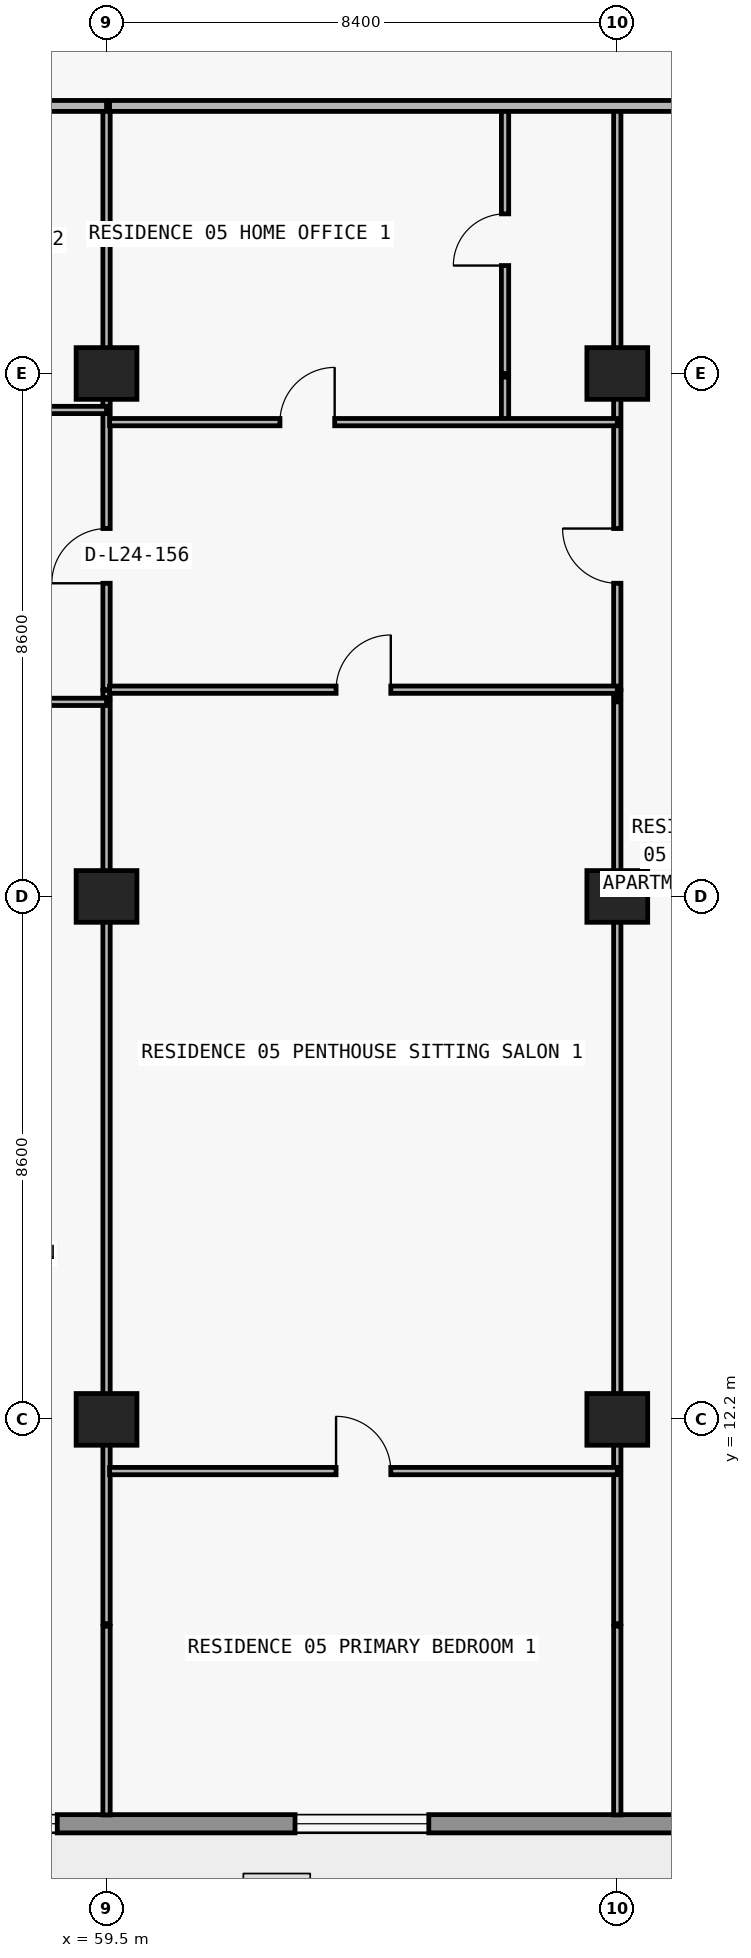
"""IFC4 building model, lengths in metres.
Left out: names, types, materials, properties, quantities, classifications, styles, units other than length and angle.
Written with IfcOpenShell. Run it as: python <this file> out.ifc"""

import sys

from ifc_helpers import new_model, si_unit, direction, frame, frame_2d, origin, origin_2d, place, context, subcontext, project, spatial, rectangle, extrude, element, fill, save


model = new_model("IFC4")
c1 = context("Model", 3, precision=1e-05, world=origin(), true_north=direction((0.0, 1.0)))
c2 = subcontext(c1, "Body", "Model", "MODEL_VIEW")
j1 = project(units=[si_unit("LENGTHUNIT", "METRE"), si_unit("PLANEANGLEUNIT", "RADIAN")], contexts=[c1])
p1 = place(None, origin())
s1 = spatial("IfcSite", under=j1, at=p1, CompositionType="ELEMENT")
p2 = place(p1, origin())
s2 = spatial("IfcBuilding", under=s1, at=p2, CompositionType="ELEMENT")
p3 = place(p2, frame((0.0, 0.0, 91.2)))
s3 = spatial("IfcBuildingStorey", under=s2, at=p3, CompositionType="ELEMENT", Elevation=91.2)
for number, where, z_axis, x_axis in (
    (1, (59.5, 12.2, 0.0), (0.0, 0.0, 1.0), (1.0, 0.0, 0.0)),
    (2, (67.9, 12.2, 0.0), (0.0, 0.0, 1.0), (1.0, 0.0, 0.0)),
    (3, (59.5, 20.8, 0.0), (0.0, 0.0, 1.0), (1.0, 0.0, 0.0)),
    (4, (67.9, 20.8, 0.0), (0.0, 0.0, 1.0), (1.0, 0.0, 0.0)),
    (5, (59.5, 29.4, 0.0), (0.0, 0.0, 1.0), (1.0, 0.0, 0.0)),
    (6, (67.9, 29.4, 0.0), (0.0, 0.0, 1.0), (1.0, 0.0, 0.0)),
):
    element("IfcColumn", number, at=place(p3, frame(where, z_axis=z_axis, x_axis=x_axis)), inside=s3, PredefinedType="COLUMN", context=c2, shape_type="SweptSolid", body=[
        extrude(rectangle(XDim=1.0, YDim=0.85, at=origin_2d()), origin(), (0.0, 0.0, 1.0), 3.05),
    ])
p4 = place(p3, frame((70.1, 5.55, 0.0), z_axis=(0.0, 0.0, 1.0), x_axis=(-1.0, 0.0, 0.0)))
e7 = element("IfcWall", 7, at=p4, inside=s3, PredefinedType="STANDARD", context=c2, shape_type="SweptSolid", body=[
    extrude(rectangle(XDim=62.4, YDim=0.3, at=frame_2d((31.2, 0.0))), origin(), (0.0, 0.0, 1.0), 3.05),
])
p5 = place(p4, frame((57.29, 0.0, 0.0)))
e8 = element("IfcOpeningElement", 8, at=p5, cuts=e7, PredefinedType="OPENING", context=c2, shape_type="SweptSolid", body=[
    extrude(rectangle(XDim=2.0, YDim=2.3, at=frame_2d((1.0, 1.15))), frame((0.0, 0.16, 0.0), z_axis=(0.0, -1.0, 0.0), x_axis=(1.0, 0.0, 0.0)), (0.0, 0.0, 1.0), 0.32),
])
p6 = place(p4, frame((52.61, 0.0, 0.65)))
e9 = element("IfcOpeningElement", 9, at=p6, cuts=e7, PredefinedType="OPENING", context=c2, shape_type="SweptSolid", body=[
    extrude(rectangle(XDim=2.6, YDim=1.85, at=frame_2d((1.3, 0.925))), frame((0.0, 0.16, 0.0), z_axis=(0.0, -1.0, 0.0), x_axis=(1.0, 0.0, 0.0)), (0.0, 0.0, 1.0), 0.32),
])
p7 = place(p4, frame((46.5, 0.0, 0.85)))
e10 = element("IfcOpeningElement", 10, at=p7, cuts=e7, PredefinedType="OPENING", context=c2, shape_type="SweptSolid", body=[
    extrude(rectangle(XDim=2.2, YDim=1.55, at=frame_2d((1.1, 0.775))), frame((0.0, 0.16, 0.0), z_axis=(0.0, -1.0, 0.0), x_axis=(1.0, 0.0, 0.0)), (0.0, 0.0, 1.0), 0.32),
])
p8 = place(p4, frame((40.09, 0.0, 0.0)))
e11 = element("IfcOpeningElement", 11, at=p8, cuts=e7, PredefinedType="OPENING", context=c2, shape_type="SweptSolid", body=[
    extrude(rectangle(XDim=2.0, YDim=2.3, at=frame_2d((1.0, 1.15))), frame((0.0, 0.16, 0.0), z_axis=(0.0, -1.0, 0.0), x_axis=(1.0, 0.0, 0.0)), (0.0, 0.0, 1.0), 0.32),
])
p9 = place(p4, frame((35.99, 0.0, 0.85)))
e12 = element("IfcOpeningElement", 12, at=p9, cuts=e7, PredefinedType="OPENING", context=c2, shape_type="SweptSolid", body=[
    extrude(rectangle(XDim=1.8, YDim=1.55, at=frame_2d((0.9, 0.775))), frame((0.0, 0.16, 0.0), z_axis=(0.0, -1.0, 0.0), x_axis=(1.0, 0.0, 0.0)), (0.0, 0.0, 1.0), 0.32),
])
p10 = place(p4, frame((28.314, 0.0, 0.85)))
e13 = element("IfcOpeningElement", 13, at=p10, cuts=e7, PredefinedType="OPENING", context=c2, shape_type="SweptSolid", body=[
    extrude(rectangle(XDim=2.2, YDim=1.55, at=frame_2d((1.1, 0.775))), frame((0.0, 0.16, 0.0), z_axis=(0.0, -1.0, 0.0), x_axis=(1.0, 0.0, 0.0)), (0.0, 0.0, 1.0), 0.32),
])
p11 = place(p4, frame((24.09, 0.0, 0.0)))
e14 = element("IfcOpeningElement", 14, at=p11, cuts=e7, PredefinedType="OPENING", context=c2, shape_type="SweptSolid", body=[
    extrude(rectangle(XDim=2.0, YDim=2.3, at=frame_2d((1.0, 1.15))), frame((0.0, 0.16, 0.0), z_axis=(0.0, -1.0, 0.0), x_axis=(1.0, 0.0, 0.0)), (0.0, 0.0, 1.0), 0.32),
])
p12 = place(p4, frame((19.99, 0.0, 0.85)))
e15 = element("IfcOpeningElement", 15, at=p12, cuts=e7, PredefinedType="OPENING", context=c2, shape_type="SweptSolid", body=[
    extrude(rectangle(XDim=1.8, YDim=1.55, at=frame_2d((0.9, 0.775))), frame((0.0, 0.16, 0.0), z_axis=(0.0, -1.0, 0.0), x_axis=(1.0, 0.0, 0.0)), (0.0, 0.0, 1.0), 0.32),
])
p13 = place(p4, frame((16.09, 0.0, 0.0)))
e16 = element("IfcOpeningElement", 16, at=p13, cuts=e7, PredefinedType="OPENING", context=c2, shape_type="SweptSolid", body=[
    extrude(rectangle(XDim=2.0, YDim=2.3, at=frame_2d((1.0, 1.15))), frame((0.0, 0.16, 0.0), z_axis=(0.0, -1.0, 0.0), x_axis=(1.0, 0.0, 0.0)), (0.0, 0.0, 1.0), 0.32),
])
p14 = place(p4, frame((11.41, 0.0, 0.65)))
e17 = element("IfcOpeningElement", 17, at=p14, cuts=e7, PredefinedType="OPENING", context=c2, shape_type="SweptSolid", body=[
    extrude(rectangle(XDim=2.6, YDim=1.85, at=frame_2d((1.3, 0.925))), frame((0.0, 0.16, 0.0), z_axis=(0.0, -1.0, 0.0), x_axis=(1.0, 0.0, 0.0)), (0.0, 0.0, 1.0), 0.32),
])
p15 = place(p4, frame((5.3, 0.0, 0.85)))
e18 = element("IfcOpeningElement", 18, at=p15, cuts=e7, PredefinedType="OPENING", context=c2, shape_type="SweptSolid", body=[
    extrude(rectangle(XDim=2.2, YDim=1.55, at=frame_2d((1.1, 0.775))), frame((0.0, 0.16, 0.0), z_axis=(0.0, -1.0, 0.0), x_axis=(1.0, 0.0, 0.0)), (0.0, 0.0, 1.0), 0.32),
])
p16 = place(p3, frame((59.5, 5.695, 0.0), z_axis=(0.0, 0.0, 1.0), x_axis=(0.0, 1.0, 0.0)))
e19 = element("IfcWall", 19, at=p16, inside=s3, PredefinedType="PARTITIONING", context=c2, shape_type="SweptSolid", body=[
    extrude(rectangle(XDim=3.105, YDim=0.12, at=frame_2d((1.552, 0.0))), origin(), (0.0, 0.0, 1.0), 3.05),
])
p17 = place(p3, frame((59.5, 8.84, 0.0), z_axis=(0.0, 0.0, 1.0), x_axis=(0.0, 1.0, 0.0)))
e20 = element("IfcWall", 20, at=p17, inside=s3, PredefinedType="PARTITIONING", context=c2, shape_type="SweptSolid", body=[
    extrude(rectangle(XDim=15.16, YDim=0.12, at=frame_2d((7.58, 0.0))), origin(), (0.0, 0.0, 1.0), 2.174),
])
p18 = place(p3, frame((59.5, 24.07, 0.0), z_axis=(0.0, 0.0, 1.0), x_axis=(0.0, 1.0, 0.0)))
e21 = element("IfcWall", 21, at=p18, inside=s3, PredefinedType="PARTITIONING", context=c2, shape_type="SweptSolid", body=[
    extrude(rectangle(XDim=0.12, YDim=0.12, at=frame_2d((0.06, 0.0))), origin(), (0.0, 0.0, 1.0), 2.174),
])
p19 = place(p3, frame((59.5, 24.2, 0.0), z_axis=(0.0, 0.0, 1.0), x_axis=(0.0, 1.0, 0.0)))
e22 = element("IfcWall", 22, at=p19, inside=s3, PredefinedType="PARTITIONING", context=c2, shape_type="SweptSolid", body=[
    extrude(rectangle(XDim=5.14, YDim=0.12, at=frame_2d((2.57, 0.0))), origin(), (0.0, 0.0, 1.0), 2.174),
])
p20 = place(p19, frame((1.75, 0.0, 0.0)))
e23 = element("IfcOpeningElement", 23, at=p20, cuts=e22, PredefinedType="OPENING", context=c2, shape_type="SweptSolid", body=[
    extrude(rectangle(XDim=0.9, YDim=2.124, at=frame_2d((0.45, 1.062))), frame((0.0, 0.07, 0.0), z_axis=(0.0, -1.0, 0.0), x_axis=(1.0, 0.0, 0.0)), (0.0, 0.0, 1.0), 0.14),
])
p21 = place(p3, frame((59.5, 29.4, 0.0), z_axis=(0.0, 0.0, 1.0), x_axis=(0.0, 1.0, 0.0)))
e24 = element("IfcWall", 24, at=p21, inside=s3, PredefinedType="PARTITIONING", context=c2, shape_type="SweptSolid", body=[
    extrude(rectangle(XDim=4.4, YDim=0.12, at=frame_2d((2.2, 0.0))), origin(), (0.0, 0.0, 1.0), 2.174),
])
p22 = place(p3, frame((66.054, 28.6, 0.0), z_axis=(0.0, 0.0, 1.0), x_axis=(0.0, 1.0, 0.0)))
e25 = element("IfcWall", 25, at=p22, inside=s3, PredefinedType="PARTITIONING", context=c2, shape_type="SweptSolid", body=[
    extrude(rectangle(XDim=0.74, YDim=0.12, at=frame_2d((0.37, 0.0))), origin(), (0.0, 0.0, 1.0), 3.05),
])
p23 = place(p3, frame((66.054, 29.4, 0.0), z_axis=(0.0, 0.0, 1.0), x_axis=(0.0, 1.0, 0.0)))
e26 = element("IfcWall", 26, at=p23, inside=s3, PredefinedType="PARTITIONING", context=c2, shape_type="SweptSolid", body=[
    extrude(rectangle(XDim=4.4, YDim=0.12, at=frame_2d((2.2, 0.0))), origin(), (0.0, 0.0, 1.0), 3.05),
])
p24 = place(p23, frame((1.775, 0.0, 0.0)))
e27 = element("IfcOpeningElement", 27, at=p24, cuts=e26, PredefinedType="OPENING", context=c2, shape_type="SweptSolid", body=[
    extrude(rectangle(XDim=0.85, YDim=2.1, at=frame_2d((0.425, 1.05))), frame((0.0, 0.07, 0.0), z_axis=(0.0, -1.0, 0.0), x_axis=(1.0, 0.0, 0.0)), (0.0, 0.0, 1.0), 0.14),
])
p25 = place(p3, frame((67.9, 5.695, 0.0), z_axis=(0.0, 0.0, 1.0), x_axis=(0.0, 1.0, 0.0)))
e28 = element("IfcWall", 28, at=p25, inside=s3, PredefinedType="PARTITIONING", context=c2, shape_type="SweptSolid", body=[
    extrude(rectangle(XDim=3.105, YDim=0.12, at=frame_2d((1.552, 0.0))), origin(), (0.0, 0.0, 1.0), 3.05),
])
p26 = place(p3, frame((67.9, 8.84, 0.0), z_axis=(0.0, 0.0, 1.0), x_axis=(0.0, 1.0, 0.0)))
e29 = element("IfcWall", 29, at=p26, inside=s3, PredefinedType="PARTITIONING", context=c2, shape_type="SweptSolid", body=[
    extrude(rectangle(XDim=15.16, YDim=0.12, at=frame_2d((7.58, 0.0))), origin(), (0.0, 0.0, 1.0), 2.174),
])
p27 = place(p3, frame((67.9, 24.07, 0.0), z_axis=(0.0, 0.0, 1.0), x_axis=(0.0, 1.0, 0.0)))
e30 = element("IfcWall", 30, at=p27, inside=s3, PredefinedType="PARTITIONING", context=c2, shape_type="SweptSolid", body=[
    extrude(rectangle(XDim=0.12, YDim=0.12, at=frame_2d((0.06, 0.0))), origin(), (0.0, 0.0, 1.0), 2.174),
])
p28 = place(p3, frame((67.9, 24.2, 0.0), z_axis=(0.0, 0.0, 1.0), x_axis=(0.0, 1.0, 0.0)))
e31 = element("IfcWall", 31, at=p28, inside=s3, PredefinedType="PARTITIONING", context=c2, shape_type="SweptSolid", body=[
    extrude(rectangle(XDim=5.14, YDim=0.12, at=frame_2d((2.57, 0.0))), origin(), (0.0, 0.0, 1.0), 2.174),
])
p29 = place(p28, frame((1.75, 0.0, 0.0)))
e32 = element("IfcOpeningElement", 32, at=p29, cuts=e31, PredefinedType="OPENING", context=c2, shape_type="SweptSolid", body=[
    extrude(rectangle(XDim=0.9, YDim=2.124, at=frame_2d((0.45, 1.062))), frame((0.0, 0.07, 0.0), z_axis=(0.0, -1.0, 0.0), x_axis=(1.0, 0.0, 0.0)), (0.0, 0.0, 1.0), 0.14),
])
p30 = place(p3, frame((67.9, 29.4, 0.0), z_axis=(0.0, 0.0, 1.0), x_axis=(0.0, 1.0, 0.0)))
e33 = element("IfcWall", 33, at=p30, inside=s3, PredefinedType="PARTITIONING", context=c2, shape_type="SweptSolid", body=[
    extrude(rectangle(XDim=4.4, YDim=0.12, at=frame_2d((2.2, 0.0))), origin(), (0.0, 0.0, 1.0), 2.174),
])
p31 = place(p3, frame((59.55, 11.35, 0.0), z_axis=(0.0, 0.0, 1.0), x_axis=(1.0, 0.0, 0.0)))
e34 = element("IfcWall", 34, at=p31, inside=s3, PredefinedType="PARTITIONING", context=c2, shape_type="SweptSolid", body=[
    extrude(rectangle(XDim=8.35, YDim=0.12, at=frame_2d((4.175, 0.0))), origin(), (0.0, 0.0, 1.0), 3.05),
])
p32 = place(p31, frame((3.725, 0.0, 0.0)))
e35 = element("IfcOpeningElement", 35, at=p32, cuts=e34, PredefinedType="OPENING", context=c2, shape_type="SweptSolid", body=[
    extrude(rectangle(XDim=0.9, YDim=2.15, at=frame_2d((0.45, 1.075))), frame((0.0, 0.07, 0.0), z_axis=(0.0, -1.0, 0.0), x_axis=(1.0, 0.0, 0.0)), (0.0, 0.0, 1.0), 0.14),
])
p33 = place(p3, frame((51.37, 24.0, 0.0), z_axis=(0.0, 0.0, 1.0), x_axis=(1.0, 0.0, 0.0)))
e36 = element("IfcWall", 36, at=p33, inside=s3, PredefinedType="PARTITIONING", context=c2, shape_type="SweptSolid", body=[
    extrude(rectangle(XDim=8.13, YDim=0.12, at=frame_2d((4.065, 0.0))), origin(), (0.0, 0.0, 1.0), 3.05),
])
p34 = place(p33, frame((1.305, 0.0, 0.0)))
e37 = element("IfcOpeningElement", 37, at=p34, cuts=e36, PredefinedType="OPENING", context=c2, shape_type="SweptSolid", body=[
    extrude(rectangle(XDim=0.9, YDim=2.15, at=frame_2d((0.45, 1.075))), frame((0.0, 0.07, 0.0), z_axis=(0.0, -1.0, 0.0), x_axis=(1.0, 0.0, 0.0)), (0.0, 0.0, 1.0), 0.14),
])
p35 = place(p3, frame((59.55, 24.2, 0.0), z_axis=(0.0, 0.0, 1.0), x_axis=(1.0, 0.0, 0.0)))
e38 = element("IfcWall", 38, at=p35, inside=s3, PredefinedType="PARTITIONING", context=c2, shape_type="SweptSolid", body=[
    extrude(rectangle(XDim=8.35, YDim=0.12, at=frame_2d((4.175, 0.0))), origin(), (0.0, 0.0, 1.0), 3.05),
])
p36 = place(p35, frame((3.725, 0.0, 0.0)))
e39 = element("IfcOpeningElement", 39, at=p36, cuts=e38, PredefinedType="OPENING", context=c2, shape_type="SweptSolid", body=[
    extrude(rectangle(XDim=0.9, YDim=2.15, at=frame_2d((0.45, 1.075))), frame((0.0, 0.07, 0.0), z_axis=(0.0, -1.0, 0.0), x_axis=(1.0, 0.0, 0.0)), (0.0, 0.0, 1.0), 0.14),
])
p37 = place(p3, frame((59.55, 28.6, 0.0), z_axis=(0.0, 0.0, 1.0), x_axis=(1.0, 0.0, 0.0)))
e40 = element("IfcWall", 40, at=p37, inside=s3, PredefinedType="PARTITIONING", context=c2, shape_type="SweptSolid", body=[
    extrude(rectangle(XDim=8.35, YDim=0.12, at=frame_2d((4.175, 0.0))), origin(), (0.0, 0.0, 1.0), 3.05),
])
p38 = place(p37, frame((2.802, 0.0, 0.0)))
e41 = element("IfcOpeningElement", 41, at=p38, cuts=e40, PredefinedType="OPENING", context=c2, shape_type="SweptSolid", body=[
    extrude(rectangle(XDim=0.9, YDim=2.15, at=frame_2d((0.45, 1.075))), frame((0.0, 0.07, 0.0), z_axis=(0.0, -1.0, 0.0), x_axis=(1.0, 0.0, 0.0)), (0.0, 0.0, 1.0), 0.14),
])
p39 = place(p3, frame((51.37, 28.8, 0.0), z_axis=(0.0, 0.0, 1.0), x_axis=(1.0, 0.0, 0.0)))
e42 = element("IfcWall", 42, at=p39, inside=s3, PredefinedType="PARTITIONING", context=c2, shape_type="SweptSolid", body=[
    extrude(rectangle(XDim=8.13, YDim=0.12, at=frame_2d((4.065, 0.0))), origin(), (0.0, 0.0, 1.0), 3.05),
])
p40 = place(p39, frame((1.305, 0.0, 0.0)))
e43 = element("IfcOpeningElement", 43, at=p40, cuts=e42, PredefinedType="OPENING", context=c2, shape_type="SweptSolid", body=[
    extrude(rectangle(XDim=0.9, YDim=2.15, at=frame_2d((0.45, 1.075))), frame((0.0, 0.07, 0.0), z_axis=(0.0, -1.0, 0.0), x_axis=(1.0, 0.0, 0.0)), (0.0, 0.0, 1.0), 0.14),
])
p41 = place(p3, frame((18.3, 33.8, 0.0), z_axis=(0.0, 0.0, 1.0), x_axis=(1.0, 0.0, 0.0)))
e44 = element("IfcWall", 44, at=p41, inside=s3, PredefinedType="PARTITIONING", context=c2, shape_type="SweptSolid", body=[
    extrude(rectangle(XDim=41.2, YDim=0.18, at=frame_2d((20.6, 0.0))), origin(), (0.0, 0.0, 1.0), 3.05),
])
p42 = place(p41, frame((10.946, 0.0, 0.0)))
e45 = element("IfcOpeningElement", 45, at=p42, cuts=e44, PredefinedType="OPENING", context=c2, shape_type="SweptSolid", body=[
    extrude(rectangle(XDim=1.0, YDim=2.2, at=frame_2d((0.5, 1.1))), frame((0.0, 0.1, 0.0), z_axis=(0.0, -1.0, 0.0), x_axis=(1.0, 0.0, 0.0)), (0.0, 0.0, 1.0), 0.2),
])
p43 = place(p41, frame((19.113, 0.0, 0.0)))
e46 = element("IfcOpeningElement", 46, at=p43, cuts=e44, PredefinedType="OPENING", context=c2, shape_type="SweptSolid", body=[
    extrude(rectangle(XDim=1.0, YDim=2.2, at=frame_2d((0.5, 1.1))), frame((0.0, 0.1, 0.0), z_axis=(0.0, -1.0, 0.0), x_axis=(1.0, 0.0, 0.0)), (0.0, 0.0, 1.0), 0.2),
])
p44 = place(p41, frame((26.976, 0.0, 0.0)))
e47 = element("IfcOpeningElement", 47, at=p44, cuts=e44, PredefinedType="OPENING", context=c2, shape_type="SweptSolid", body=[
    extrude(rectangle(XDim=1.0, YDim=2.2, at=frame_2d((0.5, 1.1))), frame((0.0, 0.1, 0.0), z_axis=(0.0, -1.0, 0.0), x_axis=(1.0, 0.0, 0.0)), (0.0, 0.0, 1.0), 0.2),
])
p45 = place(p41, frame((35.47, 0.0, 0.0)))
e48 = element("IfcOpeningElement", 48, at=p45, cuts=e44, PredefinedType="OPENING", context=c2, shape_type="SweptSolid", body=[
    extrude(rectangle(XDim=1.0, YDim=2.2, at=frame_2d((0.5, 1.1))), frame((0.0, 0.1, 0.0), z_axis=(0.0, -1.0, 0.0), x_axis=(1.0, 0.0, 0.0)), (0.0, 0.0, 1.0), 0.2),
])
p46 = place(p3, frame((59.55, 33.8, 0.0), z_axis=(0.0, 0.0, 1.0), x_axis=(1.0, 0.0, 0.0)))
e49 = element("IfcWall", 49, at=p46, inside=s3, PredefinedType="PARTITIONING", context=c2, shape_type="SweptSolid", body=[
    extrude(rectangle(XDim=10.55, YDim=0.18, at=frame_2d((5.275, 0.0))), origin(), (0.0, 0.0, 1.0), 3.05),
])
p47 = place(p14, origin())
e50 = element("IfcWindow", 50, at=p47, inside=s3, PartitioningType="SINGLE_PANEL", PredefinedType="WINDOW", context=c2, shape_type="SweptSolid", body=[
    extrude(rectangle(XDim=2.6, YDim=1.85, at=frame_2d((1.3, 0.925))), frame((0.0, 0.03, 0.0), z_axis=(0.0, -1.0, 0.0), x_axis=(1.0, 0.0, 0.0)), (0.0, 0.0, 1.0), 0.06),
])
fill(e17, e50)
p48 = place(p15, origin())
e51 = element("IfcWindow", 51, at=p48, inside=s3, PartitioningType="SINGLE_PANEL", PredefinedType="WINDOW", context=c2, shape_type="SweptSolid", body=[
    extrude(rectangle(XDim=2.2, YDim=1.55, at=frame_2d((1.1, 0.775))), frame((0.0, 0.03, 0.0), z_axis=(0.0, -1.0, 0.0), x_axis=(1.0, 0.0, 0.0)), (0.0, 0.0, 1.0), 0.06),
])
fill(e18, e51)
p49 = place(p20, origin())
e52 = element("IfcDoor", 52, at=p49, inside=s3, OperationType="SINGLE_SWING_LEFT", PredefinedType="DOOR", context=c2, shape_type="SweptSolid", body=[
    extrude(rectangle(XDim=0.9, YDim=2.124, at=frame_2d((0.45, 1.062))), frame((0.0, 0.025, 0.0), z_axis=(0.0, -1.0, 0.0), x_axis=(1.0, 0.0, 0.0)), (0.0, 0.0, 1.0), 0.05),
])
fill(e23, e52)
p50 = place(p38, origin())
e53 = element("IfcDoor", 53, at=p50, inside=s3, OperationType="SINGLE_SWING_RIGHT", PredefinedType="DOOR", context=c2, shape_type="SweptSolid", body=[
    extrude(rectangle(XDim=0.9, YDim=2.15, at=frame_2d((0.45, 1.075))), frame((0.0, 0.025, 0.0), z_axis=(0.0, -1.0, 0.0), x_axis=(1.0, 0.0, 0.0)), (0.0, 0.0, 1.0), 0.05),
])
fill(e41, e53)
p51 = place(p24, origin())
e54 = element("IfcDoor", 54, at=p51, inside=s3, OperationType="SINGLE_SWING_LEFT", PredefinedType="DOOR", context=c2, shape_type="SweptSolid", body=[
    extrude(rectangle(XDim=0.85, YDim=2.1, at=frame_2d((0.425, 1.05))), frame((0.0, 0.025, 0.0), z_axis=(0.0, -1.0, 0.0), x_axis=(1.0, 0.0, 0.0)), (0.0, 0.0, 1.0), 0.05),
])
fill(e27, e54)
p52 = place(p36, origin())
e55 = element("IfcDoor", 55, at=p52, inside=s3, OperationType="SINGLE_SWING_RIGHT", PredefinedType="DOOR", context=c2, shape_type="SweptSolid", body=[
    extrude(rectangle(XDim=0.9, YDim=2.15, at=frame_2d((0.45, 1.075))), frame((0.0, 0.025, 0.0), z_axis=(0.0, -1.0, 0.0), x_axis=(1.0, 0.0, 0.0)), (0.0, 0.0, 1.0), 0.05),
])
fill(e39, e55)
p53 = place(p32, origin())
e56 = element("IfcDoor", 56, at=p53, inside=s3, OperationType="SINGLE_SWING_LEFT", PredefinedType="DOOR", context=c2, shape_type="SweptSolid", body=[
    extrude(rectangle(XDim=0.9, YDim=2.15, at=frame_2d((0.45, 1.075))), frame((0.0, 0.025, 0.0), z_axis=(0.0, -1.0, 0.0), x_axis=(1.0, 0.0, 0.0)), (0.0, 0.0, 1.0), 0.05),
])
fill(e35, e56)
p54 = place(p29, origin())
e57 = element("IfcDoor", 57, at=p54, inside=s3, OperationType="SINGLE_SWING_RIGHT", PredefinedType="DOOR", context=c2, shape_type="SweptSolid", body=[
    extrude(rectangle(XDim=0.9, YDim=2.124, at=frame_2d((0.45, 1.062))), frame((0.0, 0.025, 0.0), z_axis=(0.0, -1.0, 0.0), x_axis=(1.0, 0.0, 0.0)), (0.0, 0.0, 1.0), 0.05),
])
fill(e32, e57)
save(model, sys.argv[1])
